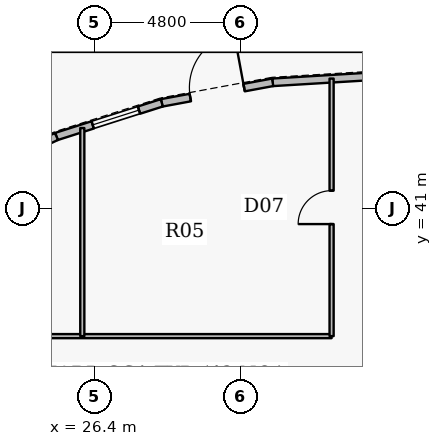
"""IFC4 building model, lengths in metres.
Left out: names, types, materials, properties, quantities, classifications, styles, units other than length and angle.
Written with IfcOpenShell. Run it as: python <this file> out.ifc"""

import sys

from ifc_helpers import new_model, si_unit, direction, frame, frame_2d, origin, origin_2d, place, context, subcontext, project, spatial, rectangle, extrude, source, transform, mapped, element, fill, save


model = new_model("IFC4")
c1 = context("Model", 3, precision=1e-05, world=origin(), true_north=direction((0.0, 1.0)))
c2 = subcontext(c1, "Body", "Model", "MODEL_VIEW")
j1 = project(units=[si_unit("LENGTHUNIT", "METRE"), si_unit("PLANEANGLEUNIT", "RADIAN")], contexts=[c1])
p1 = place(None, origin())
s1 = spatial("IfcSite", under=j1, at=p1, CompositionType="ELEMENT")
p2 = place(p1, origin())
s2 = spatial("IfcBuilding", under=s1, at=p2, CompositionType="ELEMENT")
p3 = place(p2, origin())
s3 = spatial("IfcBuildingStorey", under=s2, at=p3, CompositionType="ELEMENT", Elevation=0.0)
p4 = place(p3, frame((32.261, 45.148, 0.0), z_axis=(0.0, 0.0, 1.0), x_axis=(0.99816551411, 0.060544251933, 0.0)))
e1 = element("IfcWall", 1, at=p4, inside=s3, PredefinedType="SOLIDWALL", context=c2, shape_type="SweptSolid", body=[
    extrude(rectangle(XDim=3.746, YDim=0.25, at=frame_2d((1.873, 0.0))), origin(), (0.0, 0.0, 1.0), 4.885),
])
p5 = place(p3, frame((28.614, 44.473, 0.0), z_axis=(0.0, 0.0, 1.0), x_axis=(0.983306878602, 0.181954891374, 0.0)))
e2 = element("IfcWall", 2, at=p5, inside=s3, PredefinedType="SOLIDWALL", context=c2, shape_type="SweptSolid", body=[
    extrude(rectangle(XDim=3.709, YDim=0.25, at=frame_2d((1.854, 0.0))), origin(), (0.0, 0.0, 1.0), 4.885),
])
p6 = place(p5, frame((0.954, 0.0, 0.0)))
e3 = element("IfcOpeningElement", 3, at=p6, cuts=e2, PredefinedType="OPENING", context=c2, shape_type="SweptSolid", body=[
    extrude(rectangle(XDim=1.8, YDim=2.2, at=origin_2d()), frame((0.9, 0.135, 1.1), z_axis=(0.0, -1.0, 0.0), x_axis=(1.0, 0.0, 0.0)), (0.0, 0.0, 1.0), 0.27),
])
p7 = place(p3, frame((25.15, 43.367, 0.0), z_axis=(0.0, 0.0, 1.0), x_axis=(0.952608721119, 0.304198330777, 0.0)))
e4 = element("IfcWall", 4, at=p7, inside=s3, PredefinedType="SOLIDWALL", context=c2, shape_type="SweptSolid", body=[
    extrude(rectangle(XDim=3.636, YDim=0.25, at=frame_2d((1.818, 0.0))), origin(), (0.0, 0.0, 1.0), 4.885),
])
p8 = place(p7, frame((1.25, 0.0, 0.9)))
e5 = element("IfcOpeningElement", 5, at=p8, cuts=e4, PredefinedType="OPENING", context=c2, shape_type="SweptSolid", body=[
    extrude(rectangle(XDim=1.6, YDim=1.75, at=origin_2d()), frame((0.8, 0.135, 0.875), z_axis=(0.0, -1.0, 0.0), x_axis=(1.0, 0.0, 0.0)), (0.0, 0.0, 1.0), 0.27),
])
p9 = place(p3, frame((21.954, 41.858, 0.0), z_axis=(0.0, 0.0, 1.0), x_axis=(0.9041930697, 0.427123978146, 0.0)))
e6 = element("IfcWall", 6, at=p9, inside=s3, PredefinedType="SOLIDWALL", context=c2, shape_type="SweptSolid", body=[
    extrude(rectangle(XDim=3.534, YDim=0.25, at=frame_2d((1.767, 0.0))), origin(), (0.0, 0.0, 1.0), 5.7),
])
p10 = place(p9, frame((0.767, 0.0, 0.9)))
e7 = element("IfcOpeningElement", 7, at=p10, cuts=e6, PredefinedType="OPENING", context=c2, shape_type="SweptSolid", body=[
    extrude(rectangle(XDim=2.0, YDim=1.75, at=origin_2d()), frame((1.0, 0.135, 0.875), z_axis=(0.0, -1.0, 0.0), x_axis=(1.0, 0.0, 0.0)), (0.0, 0.0, 1.0), 0.27),
])
p11 = place(p3, frame((23.0, 36.8, 0.0), z_axis=(0.0, 0.0, 1.0), x_axis=(1.0, 0.0, 0.0)))
e8 = element("IfcWall", 8, at=p11, inside=s3, PredefinedType="PARTITIONING", context=c2, shape_type="SweptSolid", body=[
    extrude(rectangle(XDim=11.2, YDim=0.135, at=frame_2d((5.6, 0.0))), origin(), (0.0, 0.0, 1.0), 4.885),
])
p12 = place(p3, frame((26.0, 36.8, 0.0), z_axis=(0.0, 0.0, 1.0), x_axis=(0.0, 1.0, 0.0)))
e9 = element("IfcWall", 9, at=p12, inside=s3, PredefinedType="PARTITIONING", context=c2, shape_type="SweptSolid", body=[
    extrude(rectangle(XDim=6.844, YDim=0.135, at=frame_2d((3.422, 0.0))), origin(), (0.0, 0.0, 1.0), 5.7),
])
p13 = place(p3, frame((34.2, 36.8, 0.0), z_axis=(0.0, 0.0, 1.0), x_axis=(0.0, 1.0, 0.0)))
e10 = element("IfcWall", 10, at=p13, inside=s3, PredefinedType="PARTITIONING", context=c2, shape_type="SweptSolid", body=[
    extrude(rectangle(XDim=8.471, YDim=0.135, at=frame_2d((4.235, 0.0))), origin(), (0.0, 0.0, 1.0), 5.325),
])
p14 = place(p13, frame((3.685, 0.0, 0.0)))
e11 = element("IfcOpeningElement", 11, at=p14, cuts=e10, PredefinedType="OPENING", context=c2, shape_type="SweptSolid", body=[
    extrude(rectangle(XDim=1.1, YDim=2.15, at=origin_2d()), frame((0.55, 0.078, 1.075), z_axis=(0.0, -1.0, 0.0), x_axis=(1.0, 0.0, 0.0)), (0.0, 0.0, 1.0), 0.155),
])
m1 = source(origin(), c2, "Body", "SweptSolid", [
    extrude(rectangle(XDim=1.8, YDim=2.2, at=origin_2d()), frame((0.9, 0.025, 1.1), z_axis=(0.0, -1.0, 0.0), x_axis=(1.0, 0.0, 0.0)), (0.0, 0.0, 1.0), 0.05),
])
p15 = place(p6, origin())
e12 = element("IfcDoor", 12, at=p15, inside=s3, OperationType="SINGLE_SWING_RIGHT", PredefinedType="DOOR", context=c2, shape_type="MappedRepresentation", body=[
    mapped(m1, transform((0.0, 0.0, 0.0), x_axis=(1.0, 0.0, 0.0), y_axis=(0.0, 1.0, 0.0), z_axis=(0.0, 0.0, 1.0), scale=1.0)),
])
fill(e3, e12)
m2 = source(origin(), c2, "Body", "SweptSolid", [
    extrude(rectangle(XDim=1.6, YDim=1.75, at=origin_2d()), frame((0.8, 0.03, 0.875), z_axis=(0.0, -1.0, 0.0), x_axis=(1.0, 0.0, 0.0)), (0.0, 0.0, 1.0), 0.06),
])
p16 = place(p8, origin())
e13 = element("IfcWindow", 13, at=p16, inside=s3, PartitioningType="DOUBLE_PANEL_VERTICAL", PredefinedType="WINDOW", context=c2, shape_type="MappedRepresentation", body=[
    mapped(m2, transform((0.0, 0.0, 0.0), x_axis=(1.0, 0.0, 0.0), y_axis=(0.0, 1.0, 0.0), z_axis=(0.0, 0.0, 1.0), scale=1.0)),
])
fill(e5, e13)
m3 = source(origin(), c2, "Body", "SweptSolid", [
    extrude(rectangle(XDim=1.1, YDim=2.15, at=origin_2d()), frame((0.55, 0.025, 1.075), z_axis=(0.0, -1.0, 0.0), x_axis=(1.0, 0.0, 0.0)), (0.0, 0.0, 1.0), 0.05),
])
p17 = place(p14, origin())
e14 = element("IfcDoor", 14, at=p17, inside=s3, OperationType="SINGLE_SWING_LEFT", PredefinedType="DOOR", context=c2, shape_type="MappedRepresentation", body=[
    mapped(m3, transform((0.0, 0.0, 0.0), x_axis=(1.0, 0.0, 0.0), y_axis=(0.0, 1.0, 0.0), z_axis=(0.0, 0.0, 1.0), scale=1.0)),
])
fill(e11, e14)
save(model, sys.argv[1])
